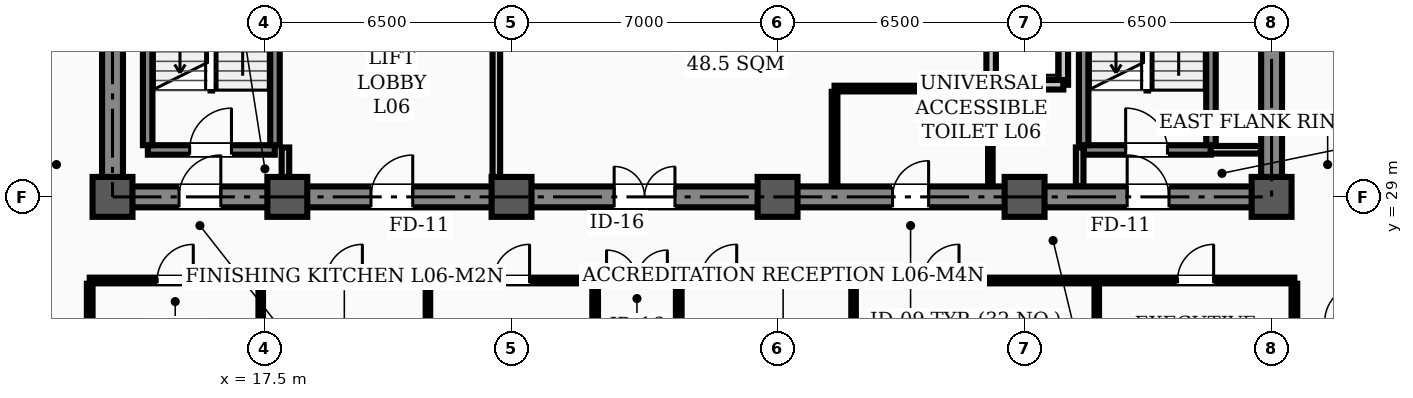
"""IFC4 building model, lengths in metres.
Left out: names, types, materials, properties, quantities, classifications, styles, units other than length and angle.
Written with IfcOpenShell. Run it as: python <this file> out.ifc"""

import sys

from ifc_helpers import new_model, si_unit, direction, frame, frame_2d, origin, origin_2d, place, context, subcontext, project, spatial, rectangle, hollow_rectangle, extrude, element, fill, save


model = new_model("IFC4")
c1 = context("Model", 3, precision=1e-05, world=origin(), true_north=direction((0.0, 1.0)))
c2 = subcontext(c1, "Body", "Model", "MODEL_VIEW")
j1 = project(units=[si_unit("LENGTHUNIT", "METRE"), si_unit("PLANEANGLEUNIT", "RADIAN")], contexts=[c1])
p1 = place(None, origin())
s1 = spatial("IfcSite", under=j1, at=p1, CompositionType="ELEMENT")
p2 = place(p1, origin())
s2 = spatial("IfcBuilding", under=s1, at=p2, CompositionType="ELEMENT")
p3 = place(p2, frame((0.0, 0.0, 26.5)))
s3 = spatial("IfcBuildingStorey", under=s2, at=p3, CompositionType="ELEMENT", Elevation=26.5)
for number, where, z_axis, x_axis in (
    (1, (13.5, 29.0, 0.0), (0.0, 0.0, 1.0), (1.0, 0.0, 0.0)),
    (2, (18.1, 29.0, 0.0), (0.0, 0.0, 1.0), (1.0, 0.0, 0.0)),
    (3, (24.0, 29.0, 0.0), (0.0, 0.0, 1.0), (1.0, 0.0, 0.0)),
    (4, (31.0, 29.0, 0.0), (0.0, 0.0, 1.0), (1.0, 0.0, 0.0)),
    (5, (37.5, 29.0, 0.0), (0.0, 0.0, 1.0), (1.0, 0.0, 0.0)),
    (6, (44.0, 29.0, 0.0), (0.0, 0.0, 1.0), (1.0, 0.0, 0.0)),
):
    element("IfcColumn", number, at=place(p3, frame(where, z_axis=z_axis, x_axis=x_axis)), inside=s3, PredefinedType="COLUMN", context=c2, shape_type="SweptSolid", body=[
        extrude(hollow_rectangle(XDim=1.05, YDim=1.05, WallThickness=0.038, InnerFilletRadius=0.019, OuterFilletRadius=0.057, at=origin_2d()), origin(), (0.0, 0.0, 1.0), 3.9),
    ])
p4 = place(p3, frame((13.5, 29.0, 0.0), z_axis=(0.0, 0.0, 1.0), x_axis=(1.0, 0.0, 0.0)))
e7 = element("IfcWall", 7, at=p4, inside=s3, PredefinedType="SHEAR", context=c2, shape_type="SweptSolid", body=[
    extrude(rectangle(XDim=30.5, YDim=0.55, at=frame_2d((15.25, 0.0))), origin(), (0.0, 0.0, 1.0), 3.72),
])
p5 = place(p4, frame((1.75, 0.0, 0.0)))
e8 = element("IfcOpeningElement", 8, at=p5, cuts=e7, PredefinedType="OPENING", context=c2, shape_type="SweptSolid", body=[
    extrude(rectangle(XDim=1.1, YDim=2.08, at=frame_2d((0.55, 1.04))), frame((0.0, 0.285, 0.0), z_axis=(0.0, -1.0, 0.0), x_axis=(1.0, 0.0, 0.0)), (0.0, 0.0, 1.0), 0.57),
])
p6 = place(p4, frame((26.7, 0.0, 0.0)))
e9 = element("IfcOpeningElement", 9, at=p6, cuts=e7, PredefinedType="OPENING", context=c2, shape_type="SweptSolid", body=[
    extrude(rectangle(XDim=1.1, YDim=2.08, at=frame_2d((0.55, 1.04))), frame((0.0, 0.285, 0.0), z_axis=(0.0, -1.0, 0.0), x_axis=(1.0, 0.0, 0.0)), (0.0, 0.0, 1.0), 0.57),
])
p7 = place(p4, frame((6.8, 0.0, 0.0)))
e10 = element("IfcOpeningElement", 10, at=p7, cuts=e7, PredefinedType="OPENING", context=c2, shape_type="SweptSolid", body=[
    extrude(rectangle(XDim=1.1, YDim=2.08, at=frame_2d((0.55, 1.04))), frame((0.0, 0.285, 0.0), z_axis=(0.0, -1.0, 0.0), x_axis=(1.0, 0.0, 0.0)), (0.0, 0.0, 1.0), 0.57),
])
p8 = place(p4, frame((13.2, 0.0, 0.0)))
e11 = element("IfcOpeningElement", 11, at=p8, cuts=e7, PredefinedType="OPENING", context=c2, shape_type="SweptSolid", body=[
    extrude(rectangle(XDim=1.6, YDim=2.08, at=frame_2d((0.8, 1.04))), frame((0.0, 0.285, 0.0), z_axis=(0.0, -1.0, 0.0), x_axis=(1.0, 0.0, 0.0)), (0.0, 0.0, 1.0), 0.57),
])
p9 = place(p4, frame((20.525, 0.0, 0.0)))
e12 = element("IfcOpeningElement", 12, at=p9, cuts=e7, PredefinedType="OPENING", context=c2, shape_type="SweptSolid", body=[
    extrude(rectangle(XDim=0.95, YDim=2.08, at=frame_2d((0.475, 1.04))), frame((0.0, 0.285, 0.0), z_axis=(0.0, -1.0, 0.0), x_axis=(1.0, 0.0, 0.0)), (0.0, 0.0, 1.0), 0.57),
])
for number, where, z_axis, x_axis in (
    (13, (13.5, 29.35, 0.0), (0.0, 0.0, 1.0), (0.0, 1.0, 0.0)),
    (14, (44.0, 29.35, 0.0), (0.0, 0.0, 1.0), (0.0, 1.0, 0.0)),
):
    element("IfcWall", number, at=place(p3, frame(where, z_axis=z_axis, x_axis=x_axis)), inside=s3, PredefinedType="SHEAR", context=c2, shape_type="SweptSolid", body=[
        extrude(rectangle(XDim=8.6, YDim=0.55, at=frame_2d((4.3, 0.0))), origin(), (0.0, 0.0, 1.0), 3.72),
    ])
p10 = place(p3, frame((14.43, 30.235, 0.0), z_axis=(0.0, 0.0, 1.0), x_axis=(1.0, 0.0, 0.0)))
e15 = element("IfcWall", 15, at=p10, inside=s3, PredefinedType="STANDARD", context=c2, shape_type="SweptSolid", body=[
    extrude(rectangle(XDim=3.34, YDim=0.25, at=frame_2d((1.67, 0.0))), origin(), (0.0, 0.0, 1.0), 3.72),
])
p11 = place(p10, frame((1.1, 0.0, 0.0)))
e16 = element("IfcOpeningElement", 16, at=p11, cuts=e15, PredefinedType="OPENING", context=c2, shape_type="SweptSolid", body=[
    extrude(rectangle(XDim=1.1, YDim=2.08, at=frame_2d((0.55, 1.04))), frame((0.0, 0.135, 0.0), z_axis=(0.0, -1.0, 0.0), x_axis=(1.0, 0.0, 0.0)), (0.0, 0.0, 1.0), 0.27),
])
for number, where, z_axis, x_axis in (
    (17, (14.425, 30.36, 0.0), (0.0, 0.0, 1.0), (0.0, 1.0, 0.0)),
    (18, (17.775, 30.36, 0.0), (0.0, 0.0, 1.0), (0.0, 1.0, 0.0)),
):
    element("IfcWall", number, at=place(p3, frame(where, z_axis=z_axis, x_axis=x_axis)), inside=s3, PredefinedType="STANDARD", context=c2, shape_type="SweptSolid", body=[
        extrude(rectangle(XDim=7.184, YDim=0.25, at=frame_2d((3.592, 0.0))), origin(), (0.0, 0.0, 1.0), 3.72),
    ])
p12 = place(p3, frame((39.06, 30.235, 0.0), z_axis=(0.0, 0.0, 1.0), x_axis=(1.0, 0.0, 0.0)))
e19 = element("IfcWall", 19, at=p12, inside=s3, PredefinedType="STANDARD", context=c2, shape_type="SweptSolid", body=[
    extrude(rectangle(XDim=3.34, YDim=0.25, at=frame_2d((1.67, 0.0))), origin(), (0.0, 0.0, 1.0), 3.72),
])
p13 = place(p12, frame((1.1, 0.0, 0.0)))
e20 = element("IfcOpeningElement", 20, at=p13, cuts=e19, PredefinedType="OPENING", context=c2, shape_type="SweptSolid", body=[
    extrude(rectangle(XDim=1.1, YDim=2.08, at=frame_2d((0.55, 1.04))), frame((0.0, 0.135, 0.0), z_axis=(0.0, -1.0, 0.0), x_axis=(1.0, 0.0, 0.0)), (0.0, 0.0, 1.0), 0.27),
])
for number, where, z_axis, x_axis in (
    (21, (39.055, 30.36, 0.0), (0.0, 0.0, 1.0), (0.0, 1.0, 0.0)),
    (22, (42.405, 30.36, 0.0), (0.0, 0.0, 1.0), (0.0, 1.0, 0.0)),
):
    element("IfcWall", number, at=place(p3, frame(where, z_axis=z_axis, x_axis=x_axis)), inside=s3, PredefinedType="STANDARD", context=c2, shape_type="SweptSolid", body=[
        extrude(rectangle(XDim=7.184, YDim=0.25, at=frame_2d((3.592, 0.0))), origin(), (0.0, 0.0, 1.0), 3.72),
    ])
p14 = place(p3, frame((36.62, 31.95, 0.0), z_axis=(0.0, 0.0, 1.0), x_axis=(0.0, 1.0, 0.0)))
e23 = element("IfcWall", 23, at=p14, inside=s3, PredefinedType="STANDARD", context=c2, shape_type="SweptSolid", body=[
    extrude(rectangle(XDim=6.0, YDim=0.25, at=frame_2d((3.0, 0.0))), origin(), (0.0, 0.0, 1.0), 3.3),
])
p15 = place(p14, frame((0.9, 0.0, 0.0)))
e24 = element("IfcOpeningElement", 24, at=p15, cuts=e23, PredefinedType="OPENING", context=c2, shape_type="SweptSolid", body=[
    extrude(rectangle(XDim=1.1, YDim=2.08, at=frame_2d((0.55, 1.04))), frame((0.0, 0.135, 0.0), z_axis=(0.0, -1.0, 0.0), x_axis=(1.0, 0.0, 0.0)), (0.0, 0.0, 1.0), 0.27),
])
p16 = place(p14, frame((4.0, 0.0, 0.0)))
e25 = element("IfcOpeningElement", 25, at=p16, cuts=e23, PredefinedType="OPENING", context=c2, shape_type="SweptSolid", body=[
    extrude(rectangle(XDim=1.1, YDim=2.08, at=frame_2d((0.55, 1.04))), frame((0.0, 0.135, 0.0), z_axis=(0.0, -1.0, 0.0), x_axis=(1.0, 0.0, 0.0)), (0.0, 0.0, 1.0), 0.27),
])
p17 = place(p3, frame((38.52, 31.95, 0.0), z_axis=(0.0, 0.0, 1.0), x_axis=(0.0, 1.0, 0.0)))
e26 = element("IfcWall", 26, at=p17, inside=s3, PredefinedType="STANDARD", context=c2, shape_type="SweptSolid", body=[
    extrude(rectangle(XDim=6.0, YDim=0.25, at=frame_2d((3.0, 0.0))), origin(), (0.0, 0.0, 1.0), 3.3),
])
p18 = place(p3, frame((36.62, 31.95, 0.0), z_axis=(0.0, 0.0, 1.0), x_axis=(1.0, 0.0, 0.0)))
e27 = element("IfcWall", 27, at=p18, inside=s3, PredefinedType="STANDARD", context=c2, shape_type="SweptSolid", body=[
    extrude(rectangle(XDim=1.9, YDim=0.25, at=frame_2d((0.95, 0.0))), origin(), (0.0, 0.0, 1.0), 3.48),
])
p19 = place(p3, frame((42.4, 30.24, 0.0), z_axis=(0.0, 0.0, 1.0), x_axis=(1.0, 0.0, 0.0)))
e28 = element("IfcWall", 28, at=p19, inside=s3, PredefinedType="STANDARD", context=c2, shape_type="SweptSolid", body=[
    extrude(rectangle(XDim=1.315, YDim=0.2, at=frame_2d((0.658, 0.0))), origin(), (0.0, 0.0, 1.0), 3.1),
])
p20 = place(p3, frame((32.5, 31.85, 0.0), z_axis=(0.0, 0.0, 1.0), x_axis=(1.0, 0.0, 0.0)))
e29 = element("IfcWall", 29, at=p20, inside=s3, PredefinedType="PARTITIONING", context=c2, shape_type="SweptSolid", body=[
    extrude(rectangle(XDim=4.1, YDim=0.15, at=frame_2d((2.05, 0.0))), origin(), (0.0, 0.0, 1.0), 3.72),
])
p21 = place(p3, frame((12.9, 26.8, 0.0), z_axis=(0.0, 0.0, 1.0), x_axis=(1.0, 0.0, 0.0)))
e30 = element("IfcWall", 30, at=p21, inside=s3, PredefinedType="PARTITIONING", context=c2, shape_type="SweptSolid", body=[
    extrude(rectangle(XDim=31.7, YDim=0.15, at=frame_2d((15.85, 0.0))), origin(), (0.0, 0.0, 1.0), 3.1),
])
p22 = place(p21, frame((13.6, 0.0, 0.0)))
e31 = element("IfcOpeningElement", 31, at=p22, cuts=e30, PredefinedType="OPENING", context=c2, shape_type="SweptSolid", body=[
    extrude(rectangle(XDim=1.6, YDim=2.08, at=frame_2d((0.8, 1.04))), frame((0.0, 0.085, 0.0), z_axis=(0.0, -1.0, 0.0), x_axis=(1.0, 0.0, 0.0)), (0.0, 0.0, 1.0), 0.17),
])
p23 = place(p21, frame((1.775, 0.0, 0.0)))
e32 = element("IfcOpeningElement", 32, at=p23, cuts=e30, PredefinedType="OPENING", context=c2, shape_type="SweptSolid", body=[
    extrude(rectangle(XDim=0.95, YDim=2.08, at=frame_2d((0.475, 1.04))), frame((0.0, 0.085, 0.0), z_axis=(0.0, -1.0, 0.0), x_axis=(1.0, 0.0, 0.0)), (0.0, 0.0, 1.0), 0.17),
])
p24 = place(p21, frame((6.225, 0.0, 0.0)))
e33 = element("IfcOpeningElement", 33, at=p24, cuts=e30, PredefinedType="OPENING", context=c2, shape_type="SweptSolid", body=[
    extrude(rectangle(XDim=0.95, YDim=2.08, at=frame_2d((0.475, 1.04))), frame((0.0, 0.085, 0.0), z_axis=(0.0, -1.0, 0.0), x_axis=(1.0, 0.0, 0.0)), (0.0, 0.0, 1.0), 0.17),
])
p25 = place(p21, frame((10.625, 0.0, 0.0)))
e34 = element("IfcOpeningElement", 34, at=p25, cuts=e30, PredefinedType="OPENING", context=c2, shape_type="SweptSolid", body=[
    extrude(rectangle(XDim=0.95, YDim=2.08, at=frame_2d((0.475, 1.04))), frame((0.0, 0.085, 0.0), z_axis=(0.0, -1.0, 0.0), x_axis=(1.0, 0.0, 0.0)), (0.0, 0.0, 1.0), 0.17),
])
p26 = place(p21, frame((16.075, 0.0, 0.0)))
e35 = element("IfcOpeningElement", 35, at=p26, cuts=e30, PredefinedType="OPENING", context=c2, shape_type="SweptSolid", body=[
    extrude(rectangle(XDim=0.95, YDim=2.08, at=frame_2d((0.475, 1.04))), frame((0.0, 0.085, 0.0), z_axis=(0.0, -1.0, 0.0), x_axis=(1.0, 0.0, 0.0)), (0.0, 0.0, 1.0), 0.17),
])
p27 = place(p21, frame((21.925, 0.0, 0.0)))
e36 = element("IfcOpeningElement", 36, at=p27, cuts=e30, PredefinedType="OPENING", context=c2, shape_type="SweptSolid", body=[
    extrude(rectangle(XDim=0.95, YDim=2.08, at=frame_2d((0.475, 1.04))), frame((0.0, 0.085, 0.0), z_axis=(0.0, -1.0, 0.0), x_axis=(1.0, 0.0, 0.0)), (0.0, 0.0, 1.0), 0.17),
])
p28 = place(p21, frame((28.625, 0.0, 0.0)))
e37 = element("IfcOpeningElement", 37, at=p28, cuts=e30, PredefinedType="OPENING", context=c2, shape_type="SweptSolid", body=[
    extrude(rectangle(XDim=0.95, YDim=2.08, at=frame_2d((0.475, 1.04))), frame((0.0, 0.085, 0.0), z_axis=(0.0, -1.0, 0.0), x_axis=(1.0, 0.0, 0.0)), (0.0, 0.0, 1.0), 0.17),
])
for number, where, z_axis, x_axis in (
    (38, (18.05, 29.285, 0.0), (0.0, 0.0, 1.0), (0.0, 1.0, 0.0)),
    (39, (38.95, 29.285, 0.0), (0.0, 0.0, 1.0), (0.0, 1.0, 0.0)),
):
    element("IfcWall", number, at=place(p3, frame(where, z_axis=z_axis, x_axis=x_axis)), inside=s3, PredefinedType="STANDARD", context=c2, shape_type="SweptSolid", body=[
        extrude(rectangle(XDim=1.015, YDim=0.2, at=frame_2d((0.508, 0.0))), origin(), (0.0, 0.0, 1.0), 3.3),
    ])
p29 = place(p3, frame((23.6, 29.285, 0.0), z_axis=(0.0, 0.0, 1.0), x_axis=(0.0, 1.0, 0.0)))
e40 = element("IfcWall", 40, at=p29, inside=s3, PredefinedType="STANDARD", context=c2, shape_type="SweptSolid", body=[
    extrude(rectangle(XDim=5.415, YDim=0.2, at=frame_2d((2.708, 0.0))), origin(), (0.0, 0.0, 1.0), 3.1),
])
p30 = place(p3, frame((32.5, 29.285, 0.0), z_axis=(0.0, 0.0, 1.0), x_axis=(0.0, 1.0, 0.0)))
e41 = element("IfcWall", 41, at=p30, inside=s3, PredefinedType="PARTITIONING", context=c2, shape_type="SweptSolid", body=[
    extrude(rectangle(XDim=2.48, YDim=0.15, at=frame_2d((1.24, 0.0))), origin(), (0.0, 0.0, 1.0), 3.3),
])
p31 = place(p3, frame((36.6, 29.285, 0.0), z_axis=(0.0, 0.0, 1.0), x_axis=(0.0, 1.0, 0.0)))
e42 = element("IfcWall", 42, at=p31, inside=s3, PredefinedType="PARTITIONING", context=c2, shape_type="SweptSolid", body=[
    extrude(rectangle(XDim=2.48, YDim=0.12, at=frame_2d((1.24, 0.0))), origin(), (0.0, 0.0, 1.0), 3.3),
])
for number, where, z_axis, x_axis in (
    (43, (26.2, 19.335, 0.0), (0.0, 0.0, 1.0), (0.0, 1.0, 0.0)),
    (44, (28.4, 19.335, 0.0), (0.0, 0.0, 1.0), (0.0, 1.0, 0.0)),
    (45, (12.9, 19.335, 0.0), (0.0, 0.0, 1.0), (0.0, 1.0, 0.0)),
    (46, (44.6, 19.335, 0.0), (0.0, 0.0, 1.0), (0.0, 1.0, 0.0)),
):
    element("IfcWall", number, at=place(p3, frame(where, z_axis=z_axis, x_axis=x_axis)), inside=s3, PredefinedType="PARTITIONING", context=c2, shape_type="SweptSolid", body=[
        extrude(rectangle(XDim=7.38, YDim=0.15, at=frame_2d((3.69, 0.0))), origin(), (0.0, 0.0, 1.0), 3.0),
    ])
for number, where, z_axis, x_axis in (
    (47, (17.4, 19.335, 0.0), (0.0, 0.0, 1.0), (0.0, 1.0, 0.0)),
    (48, (21.8, 19.335, 0.0), (0.0, 0.0, 1.0), (0.0, 1.0, 0.0)),
    (49, (33.0, 19.335, 0.0), (0.0, 0.0, 1.0), (0.0, 1.0, 0.0)),
    (50, (39.4, 19.335, 0.0), (0.0, 0.0, 1.0), (0.0, 1.0, 0.0)),
):
    element("IfcWall", number, at=place(p3, frame(where, z_axis=z_axis, x_axis=x_axis)), inside=s3, PredefinedType="PARTITIONING", context=c2, shape_type="SweptSolid", body=[
        extrude(rectangle(XDim=7.38, YDim=0.12, at=frame_2d((3.69, 0.0))), origin(), (0.0, 0.0, 1.0), 3.0),
    ])
p32 = place(p11, origin())
e51 = element("IfcDoor", 51, at=p32, inside=s3, OperationType="SINGLE_SWING_RIGHT", PredefinedType="DOOR", context=c2, shape_type="SweptSolid", body=[
    extrude(rectangle(XDim=1.1, YDim=2.08, at=frame_2d((0.55, 1.04))), frame((0.0, 0.025, 0.0), z_axis=(0.0, -1.0, 0.0), x_axis=(1.0, 0.0, 0.0)), (0.0, 0.0, 1.0), 0.05),
])
fill(e16, e51)
p33 = place(p13, origin())
e52 = element("IfcDoor", 52, at=p33, inside=s3, OperationType="SINGLE_SWING_LEFT", PredefinedType="DOOR", context=c2, shape_type="SweptSolid", body=[
    extrude(rectangle(XDim=1.1, YDim=2.08, at=frame_2d((0.55, 1.04))), frame((0.0, 0.025, 0.0), z_axis=(0.0, -1.0, 0.0), x_axis=(1.0, 0.0, 0.0)), (0.0, 0.0, 1.0), 0.05),
])
fill(e20, e52)
p34 = place(p5, origin())
e53 = element("IfcDoor", 53, at=p34, inside=s3, OperationType="SINGLE_SWING_RIGHT", PredefinedType="DOOR", context=c2, shape_type="SweptSolid", body=[
    extrude(rectangle(XDim=1.1, YDim=2.08, at=frame_2d((0.55, 1.04))), frame((0.0, 0.025, 0.0), z_axis=(0.0, -1.0, 0.0), x_axis=(1.0, 0.0, 0.0)), (0.0, 0.0, 1.0), 0.05),
])
fill(e8, e53)
p35 = place(p6, origin())
e54 = element("IfcDoor", 54, at=p35, inside=s3, OperationType="SINGLE_SWING_LEFT", PredefinedType="DOOR", context=c2, shape_type="SweptSolid", body=[
    extrude(rectangle(XDim=1.1, YDim=2.08, at=frame_2d((0.55, 1.04))), frame((0.0, 0.025, 0.0), z_axis=(0.0, -1.0, 0.0), x_axis=(1.0, 0.0, 0.0)), (0.0, 0.0, 1.0), 0.05),
])
fill(e9, e54)
p36 = place(p7, origin())
e55 = element("IfcDoor", 55, at=p36, inside=s3, OperationType="SINGLE_SWING_RIGHT", PredefinedType="DOOR", context=c2, shape_type="SweptSolid", body=[
    extrude(rectangle(XDim=1.1, YDim=2.08, at=frame_2d((0.55, 1.04))), frame((0.0, 0.025, 0.0), z_axis=(0.0, -1.0, 0.0), x_axis=(1.0, 0.0, 0.0)), (0.0, 0.0, 1.0), 0.05),
])
fill(e10, e55)
p37 = place(p8, origin())
e56 = element("IfcDoor", 56, at=p37, inside=s3, OperationType="DOUBLE_DOOR_SINGLE_SWING", PredefinedType="DOOR", context=c2, shape_type="SweptSolid", body=[
    extrude(rectangle(XDim=1.6, YDim=2.08, at=frame_2d((0.8, 1.04))), frame((0.0, 0.025, 0.0), z_axis=(0.0, -1.0, 0.0), x_axis=(1.0, 0.0, 0.0)), (0.0, 0.0, 1.0), 0.05),
])
fill(e11, e56)
p38 = place(p9, origin())
e57 = element("IfcDoor", 57, at=p38, inside=s3, OperationType="SINGLE_SWING_RIGHT", PredefinedType="DOOR", context=c2, shape_type="SweptSolid", body=[
    extrude(rectangle(XDim=0.95, YDim=2.08, at=frame_2d((0.475, 1.04))), frame((0.0, 0.025, 0.0), z_axis=(0.0, -1.0, 0.0), x_axis=(1.0, 0.0, 0.0)), (0.0, 0.0, 1.0), 0.05),
])
fill(e12, e57)
p39 = place(p22, origin())
e58 = element("IfcDoor", 58, at=p39, inside=s3, OperationType="DOUBLE_DOOR_SINGLE_SWING", PredefinedType="DOOR", context=c2, shape_type="SweptSolid", body=[
    extrude(rectangle(XDim=1.6, YDim=2.08, at=frame_2d((0.8, 1.04))), frame((0.0, 0.025, 0.0), z_axis=(0.0, -1.0, 0.0), x_axis=(1.0, 0.0, 0.0)), (0.0, 0.0, 1.0), 0.05),
])
fill(e31, e58)
p40 = place(p23, origin())
e59 = element("IfcDoor", 59, at=p40, inside=s3, OperationType="SINGLE_SWING_RIGHT", PredefinedType="DOOR", context=c2, shape_type="SweptSolid", body=[
    extrude(rectangle(XDim=0.95, YDim=2.08, at=frame_2d((0.475, 1.04))), frame((0.0, 0.025, 0.0), z_axis=(0.0, -1.0, 0.0), x_axis=(1.0, 0.0, 0.0)), (0.0, 0.0, 1.0), 0.05),
])
fill(e32, e59)
p41 = place(p24, origin())
e60 = element("IfcDoor", 60, at=p41, inside=s3, OperationType="SINGLE_SWING_RIGHT", PredefinedType="DOOR", context=c2, shape_type="SweptSolid", body=[
    extrude(rectangle(XDim=0.95, YDim=2.08, at=frame_2d((0.475, 1.04))), frame((0.0, 0.025, 0.0), z_axis=(0.0, -1.0, 0.0), x_axis=(1.0, 0.0, 0.0)), (0.0, 0.0, 1.0), 0.05),
])
fill(e33, e60)
p42 = place(p25, origin())
e61 = element("IfcDoor", 61, at=p42, inside=s3, OperationType="SINGLE_SWING_RIGHT", PredefinedType="DOOR", context=c2, shape_type="SweptSolid", body=[
    extrude(rectangle(XDim=0.95, YDim=2.08, at=frame_2d((0.475, 1.04))), frame((0.0, 0.025, 0.0), z_axis=(0.0, -1.0, 0.0), x_axis=(1.0, 0.0, 0.0)), (0.0, 0.0, 1.0), 0.05),
])
fill(e34, e61)
p43 = place(p26, origin())
e62 = element("IfcDoor", 62, at=p43, inside=s3, OperationType="SINGLE_SWING_RIGHT", PredefinedType="DOOR", context=c2, shape_type="SweptSolid", body=[
    extrude(rectangle(XDim=0.95, YDim=2.08, at=frame_2d((0.475, 1.04))), frame((0.0, 0.025, 0.0), z_axis=(0.0, -1.0, 0.0), x_axis=(1.0, 0.0, 0.0)), (0.0, 0.0, 1.0), 0.05),
])
fill(e35, e62)
p44 = place(p27, origin())
e63 = element("IfcDoor", 63, at=p44, inside=s3, OperationType="SINGLE_SWING_RIGHT", PredefinedType="DOOR", context=c2, shape_type="SweptSolid", body=[
    extrude(rectangle(XDim=0.95, YDim=2.08, at=frame_2d((0.475, 1.04))), frame((0.0, 0.025, 0.0), z_axis=(0.0, -1.0, 0.0), x_axis=(1.0, 0.0, 0.0)), (0.0, 0.0, 1.0), 0.05),
])
fill(e36, e63)
p45 = place(p28, origin())
e64 = element("IfcDoor", 64, at=p45, inside=s3, OperationType="SINGLE_SWING_RIGHT", PredefinedType="DOOR", context=c2, shape_type="SweptSolid", body=[
    extrude(rectangle(XDim=0.95, YDim=2.08, at=frame_2d((0.475, 1.04))), frame((0.0, 0.025, 0.0), z_axis=(0.0, -1.0, 0.0), x_axis=(1.0, 0.0, 0.0)), (0.0, 0.0, 1.0), 0.05),
])
fill(e37, e64)
save(model, sys.argv[1])
